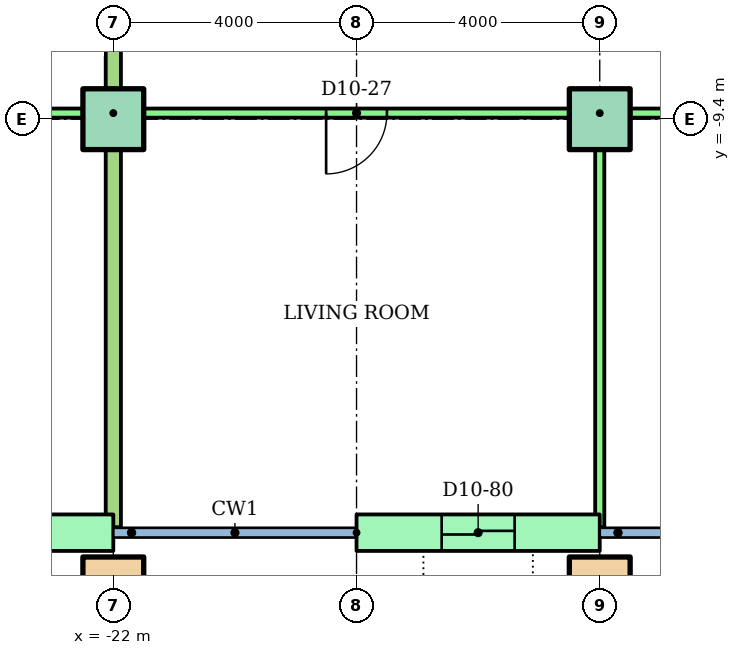
"""IFC4 building model, lengths in metres.
Left out: names, types, materials, properties, quantities, classifications, styles, units other than length and angle.
Written with IfcOpenShell. Run it as: python <this file> out.ifc"""

import sys

from ifc_helpers import new_model, si_unit, direction, frame, frame_2d, origin, origin_2d, place, context, subcontext, project, spatial, rectangle, hollow_rectangle, extrude, element, fill, save


model = new_model("IFC4")
c1 = context("Model", 3, precision=1e-05, world=origin(), true_north=direction((0.0, 1.0)))
c2 = subcontext(c1, "Body", "Model", "MODEL_VIEW")
j1 = project(units=[si_unit("LENGTHUNIT", "METRE"), si_unit("PLANEANGLEUNIT", "RADIAN")], contexts=[c1])
p1 = place(None, origin())
s1 = spatial("IfcSite", under=j1, at=p1, CompositionType="ELEMENT")
p2 = place(p1, origin())
s2 = spatial("IfcBuilding", under=s1, at=p2, CompositionType="ELEMENT")
p3 = place(p2, frame((0.0, 0.0, 41.6)))
s3 = spatial("IfcBuildingStorey", under=s2, at=p3, CompositionType="ELEMENT", Elevation=41.6)
for number, where in (
    (1, (-22.0, -17.1, 0.0)),
    (2, (-14.0, -17.1, 0.0)),
):
    element("IfcColumn", number, at=place(p3, frame(where)), inside=s3, PredefinedType="COLUMN", context=c2, shape_type="SweptSolid", body=[
        extrude(hollow_rectangle(XDim=1.0, YDim=1.0, WallThickness=0.05, at=origin_2d()), origin(), (0.0, 0.0, 1.0), 3.2),
    ])
for number, where in (
    (3, (-22.0, -9.4, 0.0)),
    (4, (-14.0, -9.4, 0.0)),
):
    element("IfcColumn", number, at=place(p3, frame(where)), inside=s3, PredefinedType="COLUMN", context=c2, shape_type="SweptSolid", body=[
        extrude(rectangle(XDim=1.0, YDim=1.0, at=origin_2d()), origin(), (0.0, 0.0, 1.0), 3.2),
    ])
p4 = place(p3, frame((-26.0, -16.2, 0.0)))
e5 = element("IfcWall", 5, at=p4, inside=s3, PredefinedType="STANDARD", context=c2, shape_type="SweptSolid", body=[
    extrude(rectangle(XDim=4.0, YDim=0.6, at=frame_2d((2.0, 0.0))), origin(), (0.0, 0.0, 1.0), 2.92),
])
p5 = place(p4, frame((1.4, 0.0, 0.0)))
e6 = element("IfcOpeningElement", 6, at=p5, cuts=e5, PredefinedType="OPENING", context=c2, shape_type="SweptSolid", body=[
    extrude(rectangle(XDim=1.2, YDim=2.1, at=frame_2d((0.6, 1.05))), frame((0.0, 0.31, 0.0), z_axis=(0.0, -1.0, 0.0), x_axis=(1.0, 0.0, 0.0)), (0.0, 0.0, 1.0), 0.62),
])
p6 = place(p3, frame((-18.0, -16.2, 0.0)))
e7 = element("IfcWall", 7, at=p6, inside=s3, PredefinedType="STANDARD", context=c2, shape_type="SweptSolid", body=[
    extrude(rectangle(XDim=4.0, YDim=0.6, at=frame_2d((2.0, 0.0))), origin(), (0.0, 0.0, 1.0), 2.92),
])
p7 = place(p6, frame((1.4, 0.0, 0.0)))
e8 = element("IfcOpeningElement", 8, at=p7, cuts=e7, PredefinedType="OPENING", context=c2, shape_type="SweptSolid", body=[
    extrude(rectangle(XDim=1.2, YDim=2.1, at=frame_2d((0.6, 1.05))), frame((0.0, 0.31, 0.0), z_axis=(0.0, -1.0, 0.0), x_axis=(1.0, 0.0, 0.0)), (0.0, 0.0, 1.0), 0.62),
])
p8 = place(p3, frame((-22.0, -9.3, 0.0), z_axis=(0.0, 0.0, 1.0), x_axis=(-1.0, 0.0, 0.0)))
e9 = element("IfcWall", 9, at=p8, inside=s3, PredefinedType="PARTITIONING", context=c2, shape_type="SweptSolid", body=[
    extrude(rectangle(XDim=14.51, YDim=0.15, at=frame_2d((7.255, 0.0))), origin(), (0.0, 0.0, 1.0), 2.4),
])
p9 = place(p8, frame((11.6, 0.0, 0.0)))
e10 = element("IfcOpeningElement", 10, at=p9, cuts=e9, PredefinedType="OPENING", context=c2, shape_type="SweptSolid", body=[
    extrude(rectangle(XDim=0.9, YDim=2.1, at=frame_2d((0.45, 1.05))), frame((0.0, 0.085, 0.0), z_axis=(0.0, -1.0, 0.0), x_axis=(1.0, 0.0, 0.0)), (0.0, 0.0, 1.0), 0.17),
])
p10 = place(p8, frame((4.4, 0.0, 0.0)))
e11 = element("IfcOpeningElement", 11, at=p10, cuts=e9, PredefinedType="OPENING", context=c2, shape_type="SweptSolid", body=[
    extrude(rectangle(XDim=1.0, YDim=2.1, at=frame_2d((0.5, 1.05))), frame((0.0, 0.085, 0.0), z_axis=(0.0, -1.0, 0.0), x_axis=(1.0, 0.0, 0.0)), (0.0, 0.0, 1.0), 0.17),
])
p11 = place(p3, frame((2.0, -9.3, 0.0), z_axis=(0.0, 0.0, 1.0), x_axis=(-1.0, 0.0, 0.0)))
e12 = element("IfcWall", 12, at=p11, inside=s3, PredefinedType="PARTITIONING", context=c2, shape_type="SweptSolid", body=[
    extrude(rectangle(XDim=24.0, YDim=0.15, at=frame_2d((12.0, 0.0))), origin(), (0.0, 0.0, 1.0), 2.4),
])
p12 = place(p11, frame((19.5, 0.0, 0.0)))
e13 = element("IfcOpeningElement", 13, at=p12, cuts=e12, PredefinedType="OPENING", context=c2, shape_type="SweptSolid", body=[
    extrude(rectangle(XDim=1.0, YDim=2.1, at=frame_2d((0.5, 1.05))), frame((0.0, 0.085, 0.0), z_axis=(0.0, -1.0, 0.0), x_axis=(1.0, 0.0, 0.0)), (0.0, 0.0, 1.0), 0.17),
])
p13 = place(p11, frame((13.55, 0.0, 0.0)))
e14 = element("IfcOpeningElement", 14, at=p13, cuts=e12, PredefinedType="OPENING", context=c2, shape_type="SweptSolid", body=[
    extrude(rectangle(XDim=0.9, YDim=2.1, at=frame_2d((0.45, 1.05))), frame((0.0, 0.085, 0.0), z_axis=(0.0, -1.0, 0.0), x_axis=(1.0, 0.0, 0.0)), (0.0, 0.0, 1.0), 0.17),
])
p14 = place(p11, frame((9.55, 0.0, 0.0)))
e15 = element("IfcOpeningElement", 15, at=p14, cuts=e12, PredefinedType="OPENING", context=c2, shape_type="SweptSolid", body=[
    extrude(rectangle(XDim=0.9, YDim=2.1, at=frame_2d((0.45, 1.05))), frame((0.0, 0.085, 0.0), z_axis=(0.0, -1.0, 0.0), x_axis=(1.0, 0.0, 0.0)), (0.0, 0.0, 1.0), 0.17),
])
p15 = place(p11, frame((5.55, 0.0, 0.0)))
e16 = element("IfcOpeningElement", 16, at=p15, cuts=e12, PredefinedType="OPENING", context=c2, shape_type="SweptSolid", body=[
    extrude(rectangle(XDim=0.9, YDim=2.1, at=frame_2d((0.45, 1.05))), frame((0.0, 0.085, 0.0), z_axis=(0.0, -1.0, 0.0), x_axis=(1.0, 0.0, 0.0)), (0.0, 0.0, 1.0), 0.17),
])
p16 = place(p11, frame((1.55, 0.0, 0.0)))
e17 = element("IfcOpeningElement", 17, at=p16, cuts=e12, PredefinedType="OPENING", context=c2, shape_type="SweptSolid", body=[
    extrude(rectangle(XDim=0.9, YDim=2.1, at=frame_2d((0.45, 1.05))), frame((0.0, 0.085, 0.0), z_axis=(0.0, -1.0, 0.0), x_axis=(1.0, 0.0, 0.0)), (0.0, 0.0, 1.0), 0.17),
])
p17 = place(p3, frame((-14.0, -9.3, 0.0), z_axis=(0.0, 0.0, 1.0), x_axis=(0.0, -1.0, 0.0)))
e18 = element("IfcWall", 18, at=p17, inside=s3, PredefinedType="PARTITIONING", context=c2, shape_type="SweptSolid", body=[
    extrude(rectangle(XDim=6.81, YDim=0.15, at=frame_2d((3.405, 0.0))), origin(), (0.0, 0.0, 1.0), 2.4),
])
p18 = place(p3, frame((-22.0, -1.4, 0.0), z_axis=(0.0, 0.0, 1.0), x_axis=(0.0, -1.0, 0.0)))
e19 = element("IfcWall", 19, at=p18, inside=s3, PredefinedType="PARTITIONING", context=c2, shape_type="SweptSolid", body=[
    extrude(rectangle(XDim=14.71, YDim=0.25, at=frame_2d((7.355, 0.0))), origin(), (0.0, 0.0, 1.0), 2.4),
])
p19 = place(p12, origin())
e20 = element("IfcDoor", 20, at=p19, inside=s3, OperationType="SINGLE_SWING_RIGHT", PredefinedType="DOOR", context=c2, shape_type="SweptSolid", body=[
    extrude(rectangle(XDim=1.0, YDim=2.1, at=frame_2d((0.5, 1.05))), frame((0.0, 0.025, 0.0), z_axis=(0.0, -1.0, 0.0), x_axis=(1.0, 0.0, 0.0)), (0.0, 0.0, 1.0), 0.05),
])
fill(e13, e20)
p20 = place(p7, origin())
e21 = element("IfcDoor", 21, at=p20, inside=s3, OperationType="SLIDING_TO_LEFT", PredefinedType="DOOR", context=c2, shape_type="SweptSolid", body=[
    extrude(rectangle(XDim=1.2, YDim=2.1, at=frame_2d((0.6, 1.05))), frame((0.0, 0.025, 0.0), z_axis=(0.0, -1.0, 0.0), x_axis=(1.0, 0.0, 0.0)), (0.0, 0.0, 1.0), 0.05),
])
fill(e8, e21)
save(model, sys.argv[1])
